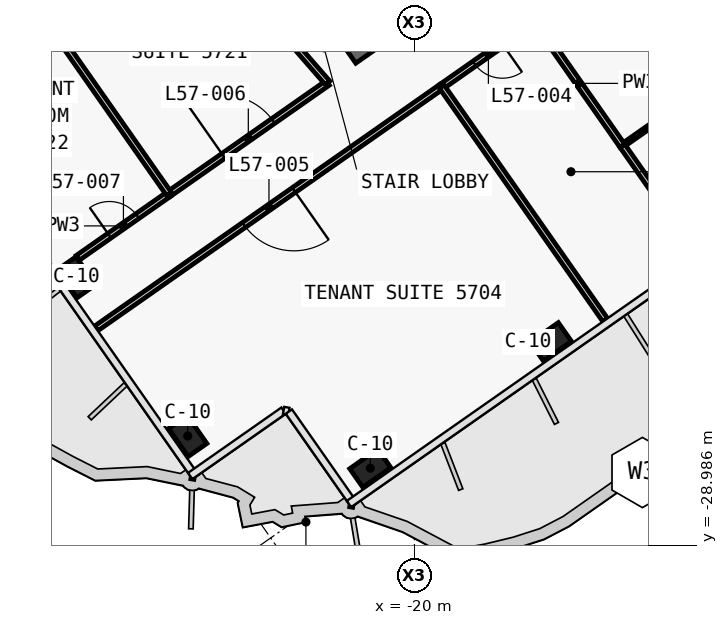
"""IFC4 building model, lengths in metres.
Left out: names, types, materials, properties, quantities, classifications, styles, units other than length and angle.
Written with IfcOpenShell. Run it as: python <this file> out.ifc"""

import sys

from ifc_helpers import new_model, si_unit, direction, frame, frame_2d, origin, origin_2d, place, context, subcontext, project, spatial, polyline, rectangle, outline, extrude, element, fill, save


model = new_model("IFC4")
c1 = context("Model", 3, precision=1e-05, world=origin(), true_north=direction((0.0, 1.0)))
c2 = subcontext(c1, "Body", "Model", "MODEL_VIEW")
j1 = project(units=[si_unit("LENGTHUNIT", "METRE"), si_unit("PLANEANGLEUNIT", "RADIAN")], contexts=[c1])
p1 = place(None, origin())
s1 = spatial("IfcSite", under=j1, at=p1, CompositionType="ELEMENT")
p2 = place(p1, origin())
s2 = spatial("IfcBuilding", under=s1, at=p2, CompositionType="ELEMENT")
p3 = place(p2, frame((0.0, 0.0, 244.9)))
s3 = spatial("IfcBuildingStorey", under=s2, at=p3, CompositionType="ELEMENT", Elevation=244.9)
p4 = place(p3, frame((-0.028, -0.874, 0.0), z_axis=(0.0, 0.0, 1.0), x_axis=(-0.819150035022, -0.573579305871, 0.0)))
e1 = element("IfcWall", 1, at=p4, inside=s3, PredefinedType="SHEAR", context=c2, shape_type="SweptSolid", body=[
    extrude(outline(polyline([(26.476, 0.3), (0.42, 0.3), (0.0, -0.3), (26.476, -0.3), (26.476, 0.3)])), origin(), (0.0, 0.0, 1.0), 3.9),
])
p5 = place(p4, frame((2.976, 0.0, 0.0)))
e2 = element("IfcOpeningElement", 2, at=p5, cuts=e1, PredefinedType="OPENING", context=c2, shape_type="SweptSolid", body=[
    extrude(rectangle(XDim=2.4, YDim=2.1, at=frame_2d((1.2, 1.05))), frame((0.0, 0.31, 0.0), z_axis=(0.0, -1.0, 0.0), x_axis=(1.0, 0.0, 0.0)), (0.0, 0.0, 1.0), 0.62),
])
p6 = place(p4, frame((11.776, 0.0, 0.0)))
e3 = element("IfcOpeningElement", 3, at=p6, cuts=e1, PredefinedType="OPENING", context=c2, shape_type="SweptSolid", body=[
    extrude(rectangle(XDim=2.4, YDim=2.1, at=frame_2d((1.2, 1.05))), frame((0.0, 0.31, 0.0), z_axis=(0.0, -1.0, 0.0), x_axis=(1.0, 0.0, 0.0)), (0.0, 0.0, 1.0), 0.62),
])
for number, where, z_axis, x_axis in (
    (4, (-16.41, -23.637, 0.0), (0.0, 0.0, 1.0), (-0.819, -0.574, 0.0)),
    (5, (-21.161, -26.964, 0.0), (0.0, 0.0, 1.0), (-0.819, -0.574, 0.0)),
    (6, (-25.966, -26.117, 0.0), (0.0, 0.0, 1.0), (-0.574, 0.819, 0.0)),
    (7, (-28.891, -21.939, 0.0), (0.0, 0.0, 1.0), (-0.574, 0.819, 0.0)),
):
    element("IfcColumn", number, at=place(p3, frame(where, z_axis=z_axis, x_axis=x_axis)), inside=s3, PredefinedType="COLUMN", context=c2, shape_type="SweptSolid", body=[
        extrude(rectangle(XDim=0.9, YDim=0.6, at=origin_2d()), origin(), (0.0, 0.0, 1.0), 3.9),
    ])
p7 = place(p3, frame((-26.459, -19.749, 0.0), z_axis=(0.0, 0.0, 1.0), x_axis=(0.819139678325, 0.573594096373, 0.0)))
e8 = element("IfcWall", 8, at=p7, inside=s3, PredefinedType="PARTITIONING", context=c2, shape_type="SweptSolid", body=[
    extrude(rectangle(XDim=5.099, YDim=0.15, at=frame_2d((2.549, 0.0))), origin(), (0.0, 0.0, 1.0), 3.05),
])
p8 = place(p7, frame((1.749, 0.0, 0.0)))
e9 = element("IfcOpeningElement", 9, at=p8, cuts=e8, PredefinedType="OPENING", context=c2, shape_type="SweptSolid", body=[
    extrude(rectangle(XDim=1.6, YDim=2.1, at=frame_2d((0.8, 1.05))), frame((0.0, 0.085, 0.0), z_axis=(0.0, -1.0, 0.0), x_axis=(1.0, 0.0, 0.0)), (0.0, 0.0, 1.0), 0.17),
])
p9 = place(p3, frame((-28.858, -21.428, 0.0), z_axis=(0.0, 0.0, 1.0), x_axis=(0.819149757547, 0.573579702143, 0.0)))
e10 = element("IfcWall", 10, at=p9, inside=s3, PredefinedType="PARTITIONING", context=c2, shape_type="SweptSolid", body=[
    extrude(rectangle(XDim=2.932, YDim=0.15, at=frame_2d((1.466, 0.0))), origin(), (0.0, 0.0, 1.0), 3.05),
])
p10 = place(p9, frame((1.016, 0.0, 0.0)))
e11 = element("IfcOpeningElement", 11, at=p10, cuts=e10, PredefinedType="OPENING", context=c2, shape_type="SweptSolid", body=[
    extrude(rectangle(XDim=0.9, YDim=2.1, at=frame_2d((0.45, 1.05))), frame((0.0, 0.085, 0.0), z_axis=(0.0, -1.0, 0.0), x_axis=(1.0, 0.0, 0.0)), (0.0, 0.0, 1.0), 0.17),
])
p11 = place(p3, frame((-16.823, -15.198, 0.0), z_axis=(0.0, 0.0, 1.0), x_axis=(-0.81916700466, -0.573555070134, 0.0)))
e12 = element("IfcWall", 12, at=p11, inside=s3, PredefinedType="PARTITIONING", context=c2, shape_type="SweptSolid", body=[
    extrude(rectangle(XDim=3.004, YDim=0.15, at=frame_2d((1.502, 0.0))), origin(), (0.0, 0.0, 1.0), 3.62),
])
p12 = place(p11, frame((1.052, 0.0, 0.0)))
e13 = element("IfcOpeningElement", 13, at=p12, cuts=e12, PredefinedType="OPENING", context=c2, shape_type="SweptSolid", body=[
    extrude(rectangle(XDim=0.9, YDim=2.1, at=frame_2d((0.45, 1.05))), frame((0.0, 0.085, 0.0), z_axis=(0.0, -1.0, 0.0), x_axis=(1.0, 0.0, 0.0)), (0.0, 0.0, 1.0), 0.17),
])
p13 = place(p3, frame((-19.281, -16.919, 0.0), z_axis=(0.0, 0.0, 1.0), x_axis=(-0.819149262835, -0.573580408658, 0.0)))
e14 = element("IfcWall", 14, at=p13, inside=s3, PredefinedType="PARTITIONING", context=c2, shape_type="SweptSolid", body=[
    extrude(rectangle(XDim=11.102, YDim=0.15, at=frame_2d((5.551, 0.0))), origin(), (0.0, 0.0, 1.0), 3.0),
])
p14 = place(p13, frame((4.751, 0.0, 0.0)))
e15 = element("IfcOpeningElement", 15, at=p14, cuts=e14, PredefinedType="OPENING", context=c2, shape_type="SweptSolid", body=[
    extrude(rectangle(XDim=1.6, YDim=2.1, at=frame_2d((0.8, 1.05))), frame((0.0, 0.085, 0.0), z_axis=(0.0, -1.0, 0.0), x_axis=(1.0, 0.0, 0.0)), (0.0, 0.0, 1.0), 0.17),
])
p15 = place(p3, frame((-22.284, -16.826, 0.0), z_axis=(0.0, 0.0, 1.0), x_axis=(-0.656758142177, 0.754101281449, 0.0)))
e16 = element("IfcWall", 16, at=p15, inside=s3, PredefinedType="PARTITIONING", context=c2, shape_type="SweptSolid", body=[
    extrude(rectangle(XDim=6.539, YDim=0.15, at=frame_2d((3.269, 0.0))), origin(), (0.0, 0.0, 1.0), 3.62),
])
p16 = place(p3, frame((-26.458, -19.747, 0.0), z_axis=(0.0, 0.0, 1.0), x_axis=(-0.573558601227, 0.819164532288, 0.0)))
e17 = element("IfcWall", 17, at=p16, inside=s3, PredefinedType="PARTITIONING", context=c2, shape_type="SweptSolid", body=[
    extrude(rectangle(XDim=7.83, YDim=0.15, at=frame_2d((3.915, 0.0))), origin(), (0.0, 0.0, 1.0), 3.0),
])
p17 = place(p3, frame((-5.929, -12.454, 0.0), z_axis=(0.0, 0.0, 1.0), x_axis=(-0.819155448096, -0.573571575181, 0.0)))
e18 = element("IfcWall", 18, at=p17, inside=s3, PredefinedType="PARTITIONING", context=c2, shape_type="SweptSolid", body=[
    extrude(rectangle(XDim=10.5, YDim=0.1, at=frame_2d((5.25, 0.0))), origin(), (0.0, 0.0, 1.0), 3.05),
])
p18 = place(p17, frame((4.8, 0.0, 0.0)))
e19 = element("IfcOpeningElement", 19, at=p18, cuts=e18, PredefinedType="OPENING", context=c2, shape_type="SweptSolid", body=[
    extrude(rectangle(XDim=0.9, YDim=2.1, at=frame_2d((0.45, 1.05))), frame((0.0, 0.06, 0.0), z_axis=(0.0, -1.0, 0.0), x_axis=(1.0, 0.0, 0.0)), (0.0, 0.0, 1.0), 0.12),
])
p19 = place(p3, frame((-12.523, -21.343, 0.0), z_axis=(0.0, 0.0, 1.0), x_axis=(-0.573555999232, 0.819166354134, 0.0)))
e20 = element("IfcWall", 20, at=p19, inside=s3, PredefinedType="PARTITIONING", context=c2, shape_type="SweptSolid", body=[
    extrude(rectangle(XDim=3.499, YDim=0.15, at=frame_2d((1.75, 0.0))), origin(), (0.0, 0.0, 1.0), 3.0),
])
p20 = place(p3, frame((-14.531, -18.476, 0.0), z_axis=(0.0, 0.0, 1.0), x_axis=(-0.573626190743, 0.819117203636, 0.0)))
e21 = element("IfcWall", 21, at=p20, inside=s3, PredefinedType="PARTITIONING", context=c2, shape_type="SweptSolid", body=[
    extrude(rectangle(XDim=4.0, YDim=0.15, at=frame_2d((2.0, 0.0))), origin(), (0.0, 0.0, 1.0), 3.62),
])
p21 = place(p3, frame((-14.98, -23.063, 0.0), z_axis=(0.0, 0.0, 1.0), x_axis=(-0.573597787563, 0.819137093595, 0.0)))
e22 = element("IfcWall", 22, at=p21, inside=s3, PredefinedType="PARTITIONING", context=c2, shape_type="SweptSolid", body=[
    extrude(rectangle(XDim=7.5, YDim=0.15, at=frame_2d((3.75, 0.0))), origin(), (0.0, 0.0, 1.0), 3.0),
])
p22 = place(p12, origin())
e23 = element("IfcDoor", 23, at=p22, inside=s3, OperationType="SINGLE_SWING_LEFT", PredefinedType="DOOR", context=c2, shape_type="SweptSolid", body=[
    extrude(rectangle(XDim=0.9, YDim=2.1, at=frame_2d((0.45, 1.05))), frame((0.0, 0.025, 0.0), z_axis=(0.0, -1.0, 0.0), x_axis=(1.0, 0.0, 0.0)), (0.0, 0.0, 1.0), 0.05),
])
fill(e13, e23)
p23 = place(p14, origin())
e24 = element("IfcDoor", 24, at=p23, inside=s3, OperationType="DOUBLE_DOOR_SINGLE_SWING", PredefinedType="DOOR", context=c2, shape_type="SweptSolid", body=[
    extrude(rectangle(XDim=1.6, YDim=2.1, at=frame_2d((0.8, 1.05))), frame((0.0, 0.025, 0.0), z_axis=(0.0, -1.0, 0.0), x_axis=(1.0, 0.0, 0.0)), (0.0, 0.0, 1.0), 0.05),
])
fill(e15, e24)
p24 = place(p8, origin())
e25 = element("IfcDoor", 25, at=p24, inside=s3, OperationType="DOUBLE_DOOR_SINGLE_SWING", PredefinedType="DOOR", context=c2, shape_type="SweptSolid", body=[
    extrude(rectangle(XDim=1.6, YDim=2.1, at=frame_2d((0.8, 1.05))), frame((0.0, 0.025, 0.0), z_axis=(0.0, -1.0, 0.0), x_axis=(1.0, 0.0, 0.0)), (0.0, 0.0, 1.0), 0.05),
])
fill(e9, e25)
p25 = place(p10, origin())
e26 = element("IfcDoor", 26, at=p25, inside=s3, OperationType="SINGLE_SWING_RIGHT", PredefinedType="DOOR", context=c2, shape_type="SweptSolid", body=[
    extrude(rectangle(XDim=0.9, YDim=2.1, at=frame_2d((0.45, 1.05))), frame((0.0, 0.025, 0.0), z_axis=(0.0, -1.0, 0.0), x_axis=(1.0, 0.0, 0.0)), (0.0, 0.0, 1.0), 0.05),
])
fill(e11, e26)
save(model, sys.argv[1])
